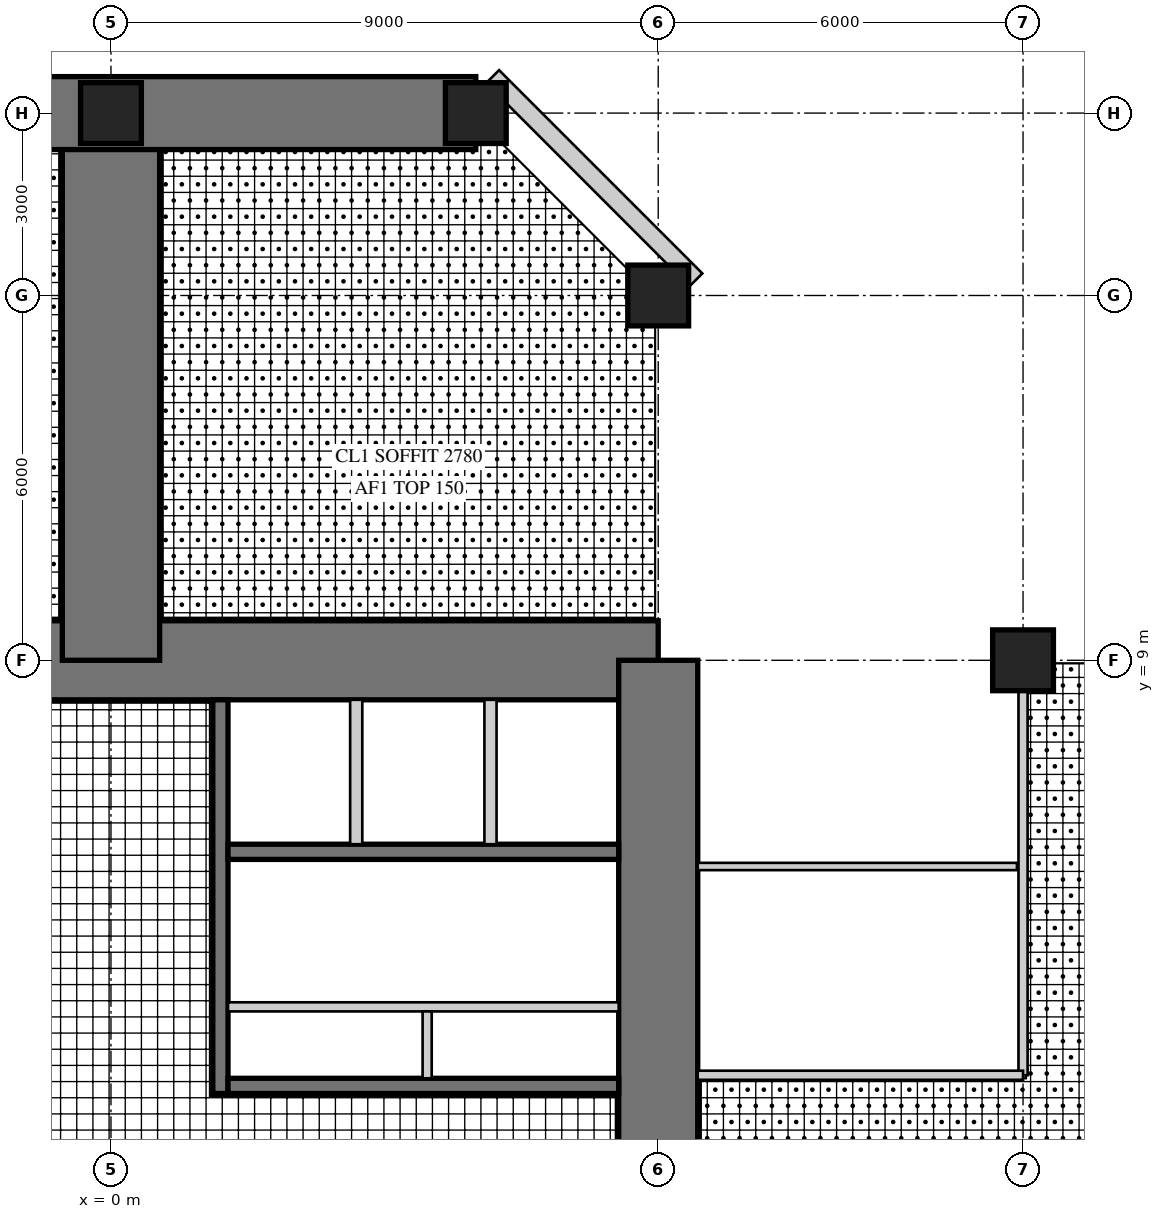
"""IFC4 building model, lengths in metres.
Left out: names, types, materials, properties, quantities, classifications, styles, units other than length and angle.
Written with IfcOpenShell. Run it as: python <this file> out.ifc"""

import sys

from ifc_helpers import new_model, si_unit, direction, frame, frame_2d, origin, origin_2d, place, context, subcontext, project, spatial, rectangle, hollow_rectangle, extrude, element, fill, save


model = new_model("IFC4")
c1 = context("Model", 3, precision=1e-05, world=origin(), true_north=direction((0.0, 1.0)))
c2 = subcontext(c1, "Body", "Model", "MODEL_VIEW")
j1 = project(units=[si_unit("LENGTHUNIT", "METRE"), si_unit("PLANEANGLEUNIT", "RADIAN")], contexts=[c1])
p1 = place(None, origin())
s1 = spatial("IfcSite", under=j1, at=p1, CompositionType="ELEMENT")
p2 = place(p1, origin())
s2 = spatial("IfcBuilding", under=s1, at=p2, CompositionType="ELEMENT")
p3 = place(p2, frame((0.0, 0.0, 116.5)))
s3 = spatial("IfcBuildingStorey", under=s2, at=p3, CompositionType="ELEMENT", Elevation=116.5)
p4 = place(p3, frame((9.0, 9.0, 0.0), z_axis=(0.0, 0.0, 1.0), x_axis=(-1.0, 0.0, 0.0)))
e1 = element("IfcWall", 1, at=p4, inside=s3, PredefinedType="SHEAR", context=c2, shape_type="SweptSolid", body=[
    extrude(rectangle(XDim=18.0, YDim=1.3, at=frame_2d((9.0, 0.0))), origin(), (0.0, 0.0, 1.0), 4.0),
])
p5 = place(p4, frame((9.8, 0.0, 0.0)))
e2 = element("IfcOpeningElement", 2, at=p5, cuts=e1, PredefinedType="OPENING", context=c2, shape_type="SweptSolid", body=[
    extrude(rectangle(XDim=1.0, YDim=2.4, at=frame_2d((0.5, 1.2))), frame((0.0, 0.66, 0.0), z_axis=(0.0, -1.0, 0.0), x_axis=(1.0, 0.0, 0.0)), (0.0, 0.0, 1.0), 1.32),
])
p6 = place(p3, frame((9.0, -9.0, 0.0), z_axis=(0.0, 0.0, 1.0), x_axis=(0.0, 1.0, 0.0)))
e3 = element("IfcWall", 3, at=p6, inside=s3, PredefinedType="SHEAR", context=c2, shape_type="SweptSolid", body=[
    extrude(rectangle(XDim=18.0, YDim=1.3, at=frame_2d((9.0, 0.0))), origin(), (0.0, 0.0, 1.0), 4.0),
])
p7 = place(p6, frame((9.8, 0.0, 0.0)))
e4 = element("IfcOpeningElement", 4, at=p7, cuts=e3, PredefinedType="OPENING", context=c2, shape_type="SweptSolid", body=[
    extrude(rectangle(XDim=1.0, YDim=2.4, at=frame_2d((0.5, 1.2))), frame((0.0, 0.66, 0.0), z_axis=(0.0, -1.0, 0.0), x_axis=(1.0, 0.0, 0.0)), (0.0, 0.0, 1.0), 1.32),
])
p8 = place(p3, frame((1.8, 1.875, 0.0), z_axis=(0.0, 0.0, 1.0), x_axis=(0.0, 1.0, 0.0)))
e5 = element("IfcWall", 5, at=p8, inside=s3, PredefinedType="SHEAR", context=c2, shape_type="SweptSolid", body=[
    extrude(rectangle(XDim=6.475, YDim=0.25, at=frame_2d((3.238, 0.0))), origin(), (0.0, 0.0, 1.0), 4.0),
])
p9 = place(p8, frame((1.875, 0.0, 0.0)))
e6 = element("IfcOpeningElement", 6, at=p9, cuts=e5, PredefinedType="OPENING", context=c2, shape_type="SweptSolid", body=[
    extrude(rectangle(XDim=1.6, YDim=2.4, at=frame_2d((0.8, 1.2))), frame((0.0, 0.135, 0.0), z_axis=(0.0, -1.0, 0.0), x_axis=(1.0, 0.0, 0.0)), (0.0, 0.0, 1.0), 0.27),
])
p10 = place(p3, frame((1.925, 2.0, 0.0), z_axis=(0.0, 0.0, 1.0), x_axis=(1.0, 0.0, 0.0)))
e7 = element("IfcWall", 7, at=p10, inside=s3, PredefinedType="SHEAR", context=c2, shape_type="SweptSolid", body=[
    extrude(rectangle(XDim=6.425, YDim=0.25, at=frame_2d((3.212, 0.0))), origin(), (0.0, 0.0, 1.0), 4.0),
])
p11 = place(p3, frame((1.925, 5.85, 0.0), z_axis=(0.0, 0.0, 1.0), x_axis=(1.0, 0.0, 0.0)))
e8 = element("IfcWall", 8, at=p11, inside=s3, PredefinedType="SHEAR", context=c2, shape_type="SweptSolid", body=[
    extrude(rectangle(XDim=6.425, YDim=0.25, at=frame_2d((3.212, 0.0))), origin(), (0.0, 0.0, 1.0), 4.0),
])
p12 = place(p11, frame((0.454, 0.0, 0.0)))
e9 = element("IfcOpeningElement", 9, at=p12, cuts=e8, PredefinedType="OPENING", context=c2, shape_type="SweptSolid", body=[
    extrude(rectangle(XDim=1.1, YDim=2.2, at=frame_2d((0.55, 1.1))), frame((0.0, 0.135, 0.0), z_axis=(0.0, -1.0, 0.0), x_axis=(1.0, 0.0, 0.0)), (0.0, 0.0, 1.0), 0.27),
])
p13 = place(p11, frame((2.663, 0.0, 0.0)))
e10 = element("IfcOpeningElement", 10, at=p13, cuts=e8, PredefinedType="OPENING", context=c2, shape_type="SweptSolid", body=[
    extrude(rectangle(XDim=1.1, YDim=2.2, at=frame_2d((0.55, 1.1))), frame((0.0, 0.135, 0.0), z_axis=(0.0, -1.0, 0.0), x_axis=(1.0, 0.0, 0.0)), (0.0, 0.0, 1.0), 0.27),
])
p14 = place(p11, frame((4.871, 0.0, 0.0)))
e11 = element("IfcOpeningElement", 11, at=p14, cuts=e8, PredefinedType="OPENING", context=c2, shape_type="SweptSolid", body=[
    extrude(rectangle(XDim=1.1, YDim=2.2, at=frame_2d((0.55, 1.1))), frame((0.0, 0.135, 0.0), z_axis=(0.0, -1.0, 0.0), x_axis=(1.0, 0.0, 0.0)), (0.0, 0.0, 1.0), 0.27),
])
p15 = place(p3, frame((1.925, 3.3, 0.0), z_axis=(0.0, 0.0, 1.0), x_axis=(1.0, 0.0, 0.0)))
e12 = element("IfcWall", 12, at=p15, inside=s3, PredefinedType="PARTITIONING", context=c2, shape_type="SweptSolid", body=[
    extrude(rectangle(XDim=6.425, YDim=0.15, at=frame_2d((3.212, 0.0))), origin(), (0.0, 0.0, 1.0), 4.0),
])
p16 = place(p15, frame((0.075, 0.0, 0.0)))
e13 = element("IfcOpeningElement", 13, at=p16, cuts=e12, PredefinedType="OPENING", context=c2, shape_type="SweptSolid", body=[
    extrude(rectangle(XDim=0.8, YDim=2.1, at=frame_2d((0.4, 1.05))), frame((0.0, 0.085, 0.0), z_axis=(0.0, -1.0, 0.0), x_axis=(1.0, 0.0, 0.0)), (0.0, 0.0, 1.0), 0.17),
])
p17 = place(p15, frame((3.675, 0.0, 0.0)))
e14 = element("IfcOpeningElement", 14, at=p17, cuts=e12, PredefinedType="OPENING", context=c2, shape_type="SweptSolid", body=[
    extrude(rectangle(XDim=0.8, YDim=2.1, at=frame_2d((0.4, 1.05))), frame((0.0, 0.085, 0.0), z_axis=(0.0, -1.0, 0.0), x_axis=(1.0, 0.0, 0.0)), (0.0, 0.0, 1.0), 0.17),
])
p18 = place(p3, frame((5.2, 2.125, 0.0), z_axis=(0.0, 0.0, 1.0), x_axis=(0.0, 1.0, 0.0)))
e15 = element("IfcWall", 15, at=p18, inside=s3, PredefinedType="PARTITIONING", context=c2, shape_type="SweptSolid", body=[
    extrude(rectangle(XDim=1.1, YDim=0.15, at=frame_2d((0.55, 0.0))), origin(), (0.0, 0.0, 1.0), 4.0),
])
for number, where, z_axis, x_axis in (
    (16, (4.033, 5.975, 0.0), (0.0, 0.0, 1.0), (0.0, 1.0, 0.0)),
    (17, (6.242, 5.975, 0.0), (0.0, 0.0, 1.0), (0.0, 1.0, 0.0)),
):
    element("IfcWall", number, at=place(p3, frame(where, z_axis=z_axis, x_axis=x_axis)), inside=s3, PredefinedType="PARTITIONING", context=c2, shape_type="SweptSolid", body=[
        extrude(rectangle(XDim=2.375, YDim=0.2, at=frame_2d((1.188, 0.0))), origin(), (0.0, 0.0, 1.0), 4.0),
    ])
p19 = place(p3, frame((0.0, 9.0, 0.0), z_axis=(0.0, 0.0, 1.0), x_axis=(0.0, 1.0, 0.0)))
e18 = element("IfcWall", 18, at=p19, inside=s3, PredefinedType="SHEAR", context=c2, shape_type="SweptSolid", body=[
    extrude(rectangle(XDim=9.0, YDim=1.6, at=frame_2d((4.5, 0.0))), origin(), (0.0, 0.0, 1.0), 4.0),
])
p20 = place(p19, frame((4.3, 0.0, 0.0)))
e19 = element("IfcOpeningElement", 19, at=p20, cuts=e18, PredefinedType="OPENING", context=c2, shape_type="SweptSolid", body=[
    extrude(rectangle(XDim=1.0, YDim=2.2, at=frame_2d((0.5, 1.1))), frame((0.0, 0.81, 0.0), z_axis=(0.0, -1.0, 0.0), x_axis=(1.0, 0.0, 0.0)), (0.0, 0.0, 1.0), 1.62),
])
p21 = place(p3, frame((6.0, 18.0, 0.0), z_axis=(0.0, 0.0, 1.0), x_axis=(-1.0, 0.0, 0.0)))
e20 = element("IfcWall", 20, at=p21, inside=s3, PredefinedType="SHEAR", context=c2, shape_type="SweptSolid", body=[
    extrude(rectangle(XDim=12.0, YDim=1.2, at=frame_2d((6.0, 0.0))), origin(), (0.0, 0.0, 1.0), 4.0),
])
p22 = place(p21, frame((1.45, 0.0, 0.6)))
e21 = element("IfcOpeningElement", 21, at=p22, cuts=e20, PredefinedType="OPENING", context=c2, shape_type="SweptSolid", body=[
    extrude(rectangle(XDim=3.0, YDim=2.4, at=frame_2d((1.5, 1.2))), frame((0.0, 0.61, 0.0), z_axis=(0.0, -1.0, 0.0), x_axis=(1.0, 0.0, 0.0)), (0.0, 0.0, 1.0), 1.22),
])
p23 = place(p21, frame((7.55, 0.0, 0.6)))
e22 = element("IfcOpeningElement", 22, at=p23, cuts=e20, PredefinedType="OPENING", context=c2, shape_type="SweptSolid", body=[
    extrude(rectangle(XDim=3.0, YDim=2.4, at=frame_2d((1.5, 1.2))), frame((0.0, 0.61, 0.0), z_axis=(0.0, -1.0, 0.0), x_axis=(1.0, 0.0, 0.0)), (0.0, 0.0, 1.0), 1.22),
])
for number, where, z_axis, x_axis in (
    (23, (9.0, 15.0, 0.0), (0.0, 0.0, 1.0), (1.0, 0.0, 0.0)),
    (24, (6.0, 18.0, 0.0), (0.0, 0.0, 1.0), (1.0, 0.0, 0.0)),
    (25, (0.0, 18.0, 0.0), (0.0, 0.0, 1.0), (1.0, 0.0, 0.0)),
    (26, (15.0, 9.0, 0.0), (0.0, 0.0, 1.0), (1.0, 0.0, 0.0)),
):
    element("IfcColumn", number, at=place(p3, frame(where, z_axis=z_axis, x_axis=x_axis)), inside=s3, PredefinedType="COLUMN", context=c2, shape_type="SweptSolid", body=[
        extrude(rectangle(XDim=1.0, YDim=1.0, at=origin_2d()), origin(), (0.0, 0.0, 1.0), 4.0),
    ])
p24 = place(p3, frame((9.62, 15.257, 0.0), z_axis=(0.0, 0.0, 1.0), x_axis=(-0.707106781187, 0.707106781187, 0.0)))
e27 = element("IfcWall", 27, at=p24, inside=s3, PredefinedType="SOLIDWALL", context=c2, shape_type="SweptSolid", body=[
    extrude(rectangle(XDim=4.728, YDim=0.3, at=frame_2d((2.364, 0.0))), origin(), (0.0, 0.0, 1.0), 3.8),
])
p25 = place(p24, frame((1.914, 0.0, 0.3)))
e28 = element("IfcOpeningElement", 28, at=p25, cuts=e27, PredefinedType="OPENING", context=c2, shape_type="SweptSolid", body=[
    extrude(rectangle(XDim=0.9, YDim=2.4, at=frame_2d((0.45, 1.2))), frame((0.0, 0.16, 0.0), z_axis=(0.0, -1.0, 0.0), x_axis=(1.0, 0.0, 0.0)), (0.0, 0.0, 1.0), 0.32),
])
p26 = place(p3, frame((15.0, 2.175, 0.0), z_axis=(0.0, 0.0, 1.0), x_axis=(0.0, 1.0, 0.0)))
e29 = element("IfcWall", 29, at=p26, inside=s3, PredefinedType="PARTITIONING", context=c2, shape_type="SweptSolid", body=[
    extrude(rectangle(XDim=6.325, YDim=0.15, at=frame_2d((3.163, 0.0))), origin(), (0.0, 0.0, 1.0), 3.0),
])
p27 = place(p26, frame((1.217, 0.0, 0.0)))
e30 = element("IfcOpeningElement", 30, at=p27, cuts=e29, PredefinedType="OPENING", context=c2, shape_type="SweptSolid", body=[
    extrude(rectangle(XDim=1.0, YDim=2.1, at=frame_2d((0.5, 1.05))), frame((0.0, 0.085, 0.0), z_axis=(0.0, -1.0, 0.0), x_axis=(1.0, 0.0, 0.0)), (0.0, 0.0, 1.0), 0.17),
])
p28 = place(p26, frame((4.379, 0.0, 0.0)))
e31 = element("IfcOpeningElement", 31, at=p28, cuts=e29, PredefinedType="OPENING", context=c2, shape_type="SweptSolid", body=[
    extrude(rectangle(XDim=1.0, YDim=2.1, at=frame_2d((0.5, 1.05))), frame((0.0, 0.085, 0.0), z_axis=(0.0, -1.0, 0.0), x_axis=(1.0, 0.0, 0.0)), (0.0, 0.0, 1.0), 0.17),
])
p29 = place(p3, frame((9.65, 2.175, 0.0), z_axis=(0.0, 0.0, 1.0), x_axis=(1.0, 0.0, 0.0)))
e32 = element("IfcWall", 32, at=p29, inside=s3, PredefinedType="PARTITIONING", context=c2, shape_type="SweptSolid", body=[
    extrude(rectangle(XDim=5.35, YDim=0.15, at=frame_2d((2.675, 0.0))), origin(), (0.0, 0.0, 1.0), 3.8),
])
p30 = place(p3, frame((9.65, 5.609, 0.0), z_axis=(0.0, 0.0, 1.0), x_axis=(1.0, 0.0, 0.0)))
e33 = element("IfcWall", 33, at=p30, inside=s3, PredefinedType="PLUMBINGWALL", context=c2, shape_type="SweptSolid", body=[
    extrude(rectangle(XDim=5.25, YDim=0.12, at=frame_2d((2.625, 0.0))), origin(), (0.0, 0.0, 1.0), 3.8),
])
p31 = place(p25, origin())
e34 = element("IfcWindow", 34, at=p31, inside=s3, PartitioningType="SINGLE_PANEL", PredefinedType="WINDOW", context=c2, shape_type="SweptSolid", body=[
    extrude(hollow_rectangle(XDim=0.9, YDim=2.4, WallThickness=0.06, at=frame_2d((0.45, 1.2))), frame((0.0, 0.03, 0.0), z_axis=(0.0, -1.0, 0.0), x_axis=(1.0, 0.0, 0.0)), (0.0, 0.0, 1.0), 0.06),
    extrude(rectangle(XDim=0.779, YDim=2.279, at=frame_2d((0.45, 1.2))), frame((0.0, 0.03, 0.0), z_axis=(0.0, -1.0, 0.0), x_axis=(1.0, 0.0, 0.0)), (0.0, 0.0, 1.0), 0.06),
])
fill(e28, e34)
p32 = place(p22, origin())
e35 = element("IfcWindow", 35, at=p32, inside=s3, PartitioningType="SINGLE_PANEL", PredefinedType="WINDOW", context=c2, shape_type="SweptSolid", body=[
    extrude(hollow_rectangle(XDim=3.0, YDim=2.4, WallThickness=0.06, at=frame_2d((1.5, 1.2))), frame((0.0, 0.03, 0.0), z_axis=(0.0, -1.0, 0.0), x_axis=(1.0, 0.0, 0.0)), (0.0, 0.0, 1.0), 0.06),
    extrude(rectangle(XDim=2.879, YDim=2.279, at=frame_2d((1.5, 1.2))), frame((0.0, 0.03, 0.0), z_axis=(0.0, -1.0, 0.0), x_axis=(1.0, 0.0, 0.0)), (0.0, 0.0, 1.0), 0.06),
])
fill(e21, e35)
p33 = place(p27, origin())
e36 = element("IfcDoor", 36, at=p33, inside=s3, OperationType="SINGLE_SWING_LEFT", PredefinedType="DOOR", context=c2, shape_type="SweptSolid", body=[
    extrude(rectangle(XDim=1.0, YDim=2.1, at=frame_2d((0.5, 1.05))), frame((0.0, 0.025, 0.0), z_axis=(0.0, -1.0, 0.0), x_axis=(1.0, 0.0, 0.0)), (0.0, 0.0, 1.0), 0.05),
])
fill(e30, e36)
p34 = place(p28, origin())
e37 = element("IfcDoor", 37, at=p34, inside=s3, OperationType="SINGLE_SWING_LEFT", PredefinedType="DOOR", context=c2, shape_type="SweptSolid", body=[
    extrude(rectangle(XDim=1.0, YDim=2.1, at=frame_2d((0.5, 1.05))), frame((0.0, 0.025, 0.0), z_axis=(0.0, -1.0, 0.0), x_axis=(1.0, 0.0, 0.0)), (0.0, 0.0, 1.0), 0.05),
])
fill(e31, e37)
p35 = place(p20, origin())
e38 = element("IfcDoor", 38, at=p35, inside=s3, OperationType="SINGLE_SWING_RIGHT", PredefinedType="DOOR", context=c2, shape_type="SweptSolid", body=[
    extrude(rectangle(XDim=1.0, YDim=2.2, at=frame_2d((0.5, 1.1))), frame((0.0, 0.025, 0.0), z_axis=(0.0, -1.0, 0.0), x_axis=(1.0, 0.0, 0.0)), (0.0, 0.0, 1.0), 0.05),
])
fill(e19, e38)
p36 = place(p5, frame((1.0, 0.0, 0.0), z_axis=(0.0, 0.0, 1.0), x_axis=(-1.0, 0.0, 0.0)))
e39 = element("IfcDoor", 39, at=p36, inside=s3, OperationType="SINGLE_SWING_RIGHT", PredefinedType="DOOR", context=c2, shape_type="SweptSolid", body=[
    extrude(rectangle(XDim=1.0, YDim=2.4, at=frame_2d((0.5, 1.2))), frame((0.0, -0.005, 0.0), z_axis=(0.0, -1.0, 0.0), x_axis=(1.0, 0.0, 0.0)), (0.0, 0.0, 1.0), 0.05),
])
fill(e2, e39)
p37 = place(p7, frame((1.0, 0.0, 0.0), z_axis=(0.0, 0.0, 1.0), x_axis=(-1.0, 0.0, 0.0)))
e40 = element("IfcDoor", 40, at=p37, inside=s3, OperationType="SINGLE_SWING_RIGHT", PredefinedType="DOOR", context=c2, shape_type="SweptSolid", body=[
    extrude(rectangle(XDim=1.0, YDim=2.4, at=frame_2d((0.5, 1.2))), frame((0.0, -0.005, 0.0), z_axis=(0.0, -1.0, 0.0), x_axis=(1.0, 0.0, 0.0)), (0.0, 0.0, 1.0), 0.05),
])
fill(e4, e40)
p38 = place(p12, origin())
e41 = element("IfcDoor", 41, at=p38, inside=s3, OperationType="DOUBLE_DOOR_SLIDING", PredefinedType="DOOR", context=c2, shape_type="SweptSolid", body=[
    extrude(rectangle(XDim=1.1, YDim=2.2, at=frame_2d((0.55, 1.1))), frame((0.0, 0.025, 0.0), z_axis=(0.0, -1.0, 0.0), x_axis=(1.0, 0.0, 0.0)), (0.0, 0.0, 1.0), 0.05),
])
fill(e9, e41)
p39 = place(p13, origin())
e42 = element("IfcDoor", 42, at=p39, inside=s3, OperationType="DOUBLE_DOOR_SLIDING", PredefinedType="DOOR", context=c2, shape_type="SweptSolid", body=[
    extrude(rectangle(XDim=1.1, YDim=2.2, at=frame_2d((0.55, 1.1))), frame((0.0, 0.025, 0.0), z_axis=(0.0, -1.0, 0.0), x_axis=(1.0, 0.0, 0.0)), (0.0, 0.0, 1.0), 0.05),
])
fill(e10, e42)
p40 = place(p14, origin())
e43 = element("IfcDoor", 43, at=p40, inside=s3, OperationType="DOUBLE_DOOR_SLIDING", PredefinedType="DOOR", context=c2, shape_type="SweptSolid", body=[
    extrude(rectangle(XDim=1.1, YDim=2.2, at=frame_2d((0.55, 1.1))), frame((0.0, 0.025, 0.0), z_axis=(0.0, -1.0, 0.0), x_axis=(1.0, 0.0, 0.0)), (0.0, 0.0, 1.0), 0.05),
])
fill(e11, e43)
p41 = place(p9, origin())
e44 = element("IfcDoor", 44, at=p41, inside=s3, OperationType="DOUBLE_DOOR_DOUBLE_SWING", PredefinedType="DOOR", context=c2, shape_type="SweptSolid", body=[
    extrude(rectangle(XDim=1.6, YDim=2.4, at=frame_2d((0.8, 1.2))), frame((0.0, 0.025, 0.0), z_axis=(0.0, -1.0, 0.0), x_axis=(1.0, 0.0, 0.0)), (0.0, 0.0, 1.0), 0.05),
])
fill(e6, e44)
p42 = place(p16, frame((0.8, 0.0, 0.0), z_axis=(0.0, 0.0, 1.0), x_axis=(-1.0, 0.0, 0.0)))
e45 = element("IfcDoor", 45, at=p42, inside=s3, OperationType="SINGLE_SWING_RIGHT", PredefinedType="DOOR", context=c2, shape_type="SweptSolid", body=[
    extrude(rectangle(XDim=0.8, YDim=2.1, at=frame_2d((0.4, 1.05))), frame((0.0, 0.025, 0.0), z_axis=(0.0, -1.0, 0.0), x_axis=(1.0, 0.0, 0.0)), (0.0, 0.0, 1.0), 0.05),
])
fill(e13, e45)
p43 = place(p17, frame((0.8, 0.0, 0.0), z_axis=(0.0, 0.0, 1.0), x_axis=(-1.0, 0.0, 0.0)))
e46 = element("IfcDoor", 46, at=p43, inside=s3, OperationType="SINGLE_SWING_RIGHT", PredefinedType="DOOR", context=c2, shape_type="SweptSolid", body=[
    extrude(rectangle(XDim=0.8, YDim=2.1, at=frame_2d((0.4, 1.05))), frame((0.0, 0.025, 0.0), z_axis=(0.0, -1.0, 0.0), x_axis=(1.0, 0.0, 0.0)), (0.0, 0.0, 1.0), 0.05),
])
fill(e14, e46)
save(model, sys.argv[1])
